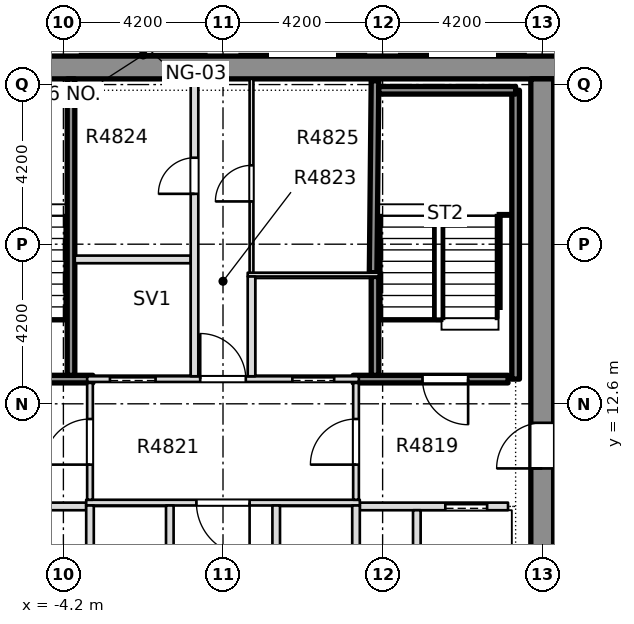
"""IFC4 building model, lengths in metres.
Left out: names, types, materials, properties, quantities, classifications, styles, units other than length and angle.
Written with IfcOpenShell. Run it as: python <this file> out.ifc"""

import sys

from ifc_helpers import new_model, si_unit, direction, frame, frame_2d, origin, place, context, subcontext, project, spatial, rectangle, extrude, element, fill, save


model = new_model("IFC4")
c1 = context("Model", 3, precision=1e-05, world=origin(), true_north=direction((0.0, 1.0)))
c2 = subcontext(c1, "Body", "Model", "MODEL_VIEW")
j1 = project(units=[si_unit("LENGTHUNIT", "METRE"), si_unit("PLANEANGLEUNIT", "RADIAN")], contexts=[c1])
p1 = place(None, origin())
s1 = spatial("IfcSite", under=j1, at=p1, CompositionType="ELEMENT")
p2 = place(p1, origin())
s2 = spatial("IfcBuilding", under=s1, at=p2, CompositionType="ELEMENT")
p3 = place(p2, frame((0.0, 0.0, 185.9)))
s3 = spatial("IfcBuildingStorey", under=s2, at=p3, CompositionType="ELEMENT", Elevation=185.9)
p4 = place(p3, frame((-12.0, 21.45, -0.4), z_axis=(0.0, 0.0, 1.0), x_axis=(1.0, 0.0, 0.0)))
e1 = element("IfcWall", 1, at=p4, inside=s3, PredefinedType="SHEAR", context=c2, shape_type="SweptSolid", body=[
    extrude(rectangle(XDim=24.0, YDim=0.6, at=frame_2d((12.0, 0.0))), origin(), (0.0, 0.0, 1.0), 3.45),
])
p5 = place(p3, frame((8.4, -7.8, -0.4), z_axis=(0.0, 0.0, 1.0), x_axis=(0.0, 1.0, 0.0)))
e2 = element("IfcWall", 2, at=p5, inside=s3, PredefinedType="SHEAR", context=c2, shape_type="SweptSolid", body=[
    extrude(rectangle(XDim=28.95, YDim=0.6, at=frame_2d((14.475, 0.0))), origin(), (0.0, 0.0, 1.0), 3.45),
])
p6 = place(p5, frame((18.7, 0.0, 0.4)))
e3 = element("IfcOpeningElement", 3, at=p6, cuts=e2, PredefinedType="OPENING", context=c2, shape_type="SweptSolid", body=[
    extrude(rectangle(XDim=1.2, YDim=2.1, at=frame_2d((0.6, 1.05))), frame((0.0, 0.31, 0.0), z_axis=(0.0, -1.0, 0.0), x_axis=(1.0, 0.0, 0.0)), (0.0, 0.0, 1.0), 0.62),
])
p7 = place(p3, frame((-7.5, 9.9, 0.0), z_axis=(0.0, 0.0, 1.0), x_axis=(1.0, 0.0, 0.0)))
e4 = element("IfcWall", 4, at=p7, inside=s3, PredefinedType="PARTITIONING", context=c2, shape_type="SweptSolid", body=[
    extrude(rectangle(XDim=3.9, YDim=0.2, at=frame_2d((1.95, 0.0))), origin(), (0.0, 0.0, 1.0), 3.05),
])
p8 = place(p7, frame((0.55, 0.0, 0.0)))
e5 = element("IfcOpeningElement", 5, at=p8, cuts=e4, PredefinedType="OPENING", context=c2, shape_type="SweptSolid", body=[
    extrude(rectangle(XDim=1.1, YDim=2.1, at=frame_2d((0.55, 1.05))), frame((0.0, 0.11, 0.0), z_axis=(0.0, -1.0, 0.0), x_axis=(1.0, 0.0, 0.0)), (0.0, 0.0, 1.0), 0.22),
])
p9 = place(p3, frame((3.6, 9.9, 0.0), z_axis=(0.0, 0.0, 1.0), x_axis=(1.0, 0.0, 0.0)))
e6 = element("IfcWall", 6, at=p9, inside=s3, PredefinedType="PARTITIONING", context=c2, shape_type="SweptSolid", body=[
    extrude(rectangle(XDim=3.9, YDim=0.2, at=frame_2d((1.95, 0.0))), origin(), (0.0, 0.0, 1.0), 3.05),
])
p10 = place(p9, frame((2.25, 0.0, 0.0)))
e7 = element("IfcOpeningElement", 7, at=p10, cuts=e6, PredefinedType="OPENING", context=c2, shape_type="SweptSolid", body=[
    extrude(rectangle(XDim=1.1, YDim=2.1, at=frame_2d((0.55, 1.05))), frame((0.0, 0.11, 0.0), z_axis=(0.0, -1.0, 0.0), x_axis=(1.0, 0.0, 0.0)), (0.0, 0.0, 1.0), 0.22),
])
p11 = place(p3, frame((-3.6, 10.0, 0.0), z_axis=(0.0, 0.0, 1.0), x_axis=(1.0, 0.0, 0.0)))
e8 = element("IfcWall", 8, at=p11, inside=s3, PredefinedType="PARTITIONING", context=c2, shape_type="SweptSolid", body=[
    extrude(rectangle(XDim=7.2, YDim=0.15, at=frame_2d((3.6, 0.0))), origin(), (0.0, 0.0, 1.0), 3.05),
])
p12 = place(p11, frame((2.9, 0.0, 0.0)))
e9 = element("IfcOpeningElement", 9, at=p12, cuts=e8, PredefinedType="OPENING", context=c2, shape_type="SweptSolid", body=[
    extrude(rectangle(XDim=1.4, YDim=2.1, at=frame_2d((0.7, 1.05))), frame((0.0, 0.085, 0.0), z_axis=(0.0, -1.0, 0.0), x_axis=(1.0, 0.0, 0.0)), (0.0, 0.0, 1.0), 0.17),
])
p13 = place(p3, frame((-7.5, 13.25, 0.0), z_axis=(0.0, 0.0, 1.0), x_axis=(1.0, 0.0, 0.0)))
e10 = element("IfcWall", 10, at=p13, inside=s3, PredefinedType="SOLIDWALL", context=c2, shape_type="SweptSolid", body=[
    extrude(rectangle(XDim=4.075, YDim=0.2, at=frame_2d((2.038, 0.0))), origin(), (0.0, 0.0, 1.0), 3.05),
])
p14 = place(p13, frame((1.05, 0.0, 0.0)))
e11 = element("IfcOpeningElement", 11, at=p14, cuts=e10, PredefinedType="OPENING", context=c2, shape_type="SweptSolid", body=[
    extrude(rectangle(XDim=1.2, YDim=2.1, at=frame_2d((0.6, 1.05))), frame((0.0, 0.11, 0.0), z_axis=(0.0, -1.0, 0.0), x_axis=(1.0, 0.0, 0.0)), (0.0, 0.0, 1.0), 0.22),
])
p15 = place(p3, frame((-3.575, 13.25, 0.0), z_axis=(0.0, 0.0, 1.0), x_axis=(1.0, 0.0, 0.0)))
e12 = element("IfcWall", 12, at=p15, inside=s3, PredefinedType="PARTITIONING", context=c2, shape_type="SweptSolid", body=[
    extrude(rectangle(XDim=7.15, YDim=0.15, at=frame_2d((3.575, 0.0))), origin(), (0.0, 0.0, 1.0), 3.05),
])
p16 = place(p15, frame((0.6, 0.0, 0.0)))
e13 = element("IfcOpeningElement", 13, at=p16, cuts=e12, PredefinedType="OPENING", context=c2, shape_type="SweptSolid", body=[
    extrude(rectangle(XDim=1.2, YDim=2.1, at=frame_2d((0.6, 1.05))), frame((0.0, 0.085, 0.0), z_axis=(0.0, -1.0, 0.0), x_axis=(1.0, 0.0, 0.0)), (0.0, 0.0, 1.0), 0.17),
])
p17 = place(p15, frame((5.4, 0.0, 0.0)))
e14 = element("IfcOpeningElement", 14, at=p17, cuts=e12, PredefinedType="OPENING", context=c2, shape_type="SweptSolid", body=[
    extrude(rectangle(XDim=1.1, YDim=2.1, at=frame_2d((0.55, 1.05))), frame((0.0, 0.085, 0.0), z_axis=(0.0, -1.0, 0.0), x_axis=(1.0, 0.0, 0.0)), (0.0, 0.0, 1.0), 0.17),
])
p18 = place(p15, frame((2.975, 0.0, 0.0)))
e15 = element("IfcOpeningElement", 15, at=p18, cuts=e12, PredefinedType="OPENING", context=c2, shape_type="SweptSolid", body=[
    extrude(rectangle(XDim=1.2, YDim=2.1, at=frame_2d((0.6, 1.05))), frame((0.0, 0.085, 0.0), z_axis=(0.0, -1.0, 0.0), x_axis=(1.0, 0.0, 0.0)), (0.0, 0.0, 1.0), 0.17),
])
p19 = place(p3, frame((3.425, 13.25, 0.0), z_axis=(0.0, 0.0, 1.0), x_axis=(1.0, 0.0, 0.0)))
e16 = element("IfcWall", 16, at=p19, inside=s3, PredefinedType="SOLIDWALL", context=c2, shape_type="SweptSolid", body=[
    extrude(rectangle(XDim=4.075, YDim=0.2, at=frame_2d((2.038, 0.0))), origin(), (0.0, 0.0, 1.0), 3.05),
])
p20 = place(p19, frame((1.825, 0.0, 0.0)))
e17 = element("IfcOpeningElement", 17, at=p20, cuts=e16, PredefinedType="OPENING", context=c2, shape_type="SweptSolid", body=[
    extrude(rectangle(XDim=1.2, YDim=2.1, at=frame_2d((0.6, 1.05))), frame((0.0, 0.11, 0.0), z_axis=(0.0, -1.0, 0.0), x_axis=(1.0, 0.0, 0.0)), (0.0, 0.0, 1.0), 0.22),
])
p21 = place(p3, frame((0.65, 16.0, 0.0), z_axis=(0.0, 0.0, 1.0), x_axis=(1.0, 0.0, 0.0)))
e18 = element("IfcWall", 18, at=p21, inside=s3, PredefinedType="PARTITIONING", context=c2, shape_type="SweptSolid", body=[
    extrude(rectangle(XDim=3.45, YDim=0.1, at=frame_2d((1.725, 0.0))), origin(), (0.0, 0.0, 1.0), 3.05),
])
p22 = place(p3, frame((-3.9, 16.4, 0.0), z_axis=(0.0, 0.0, 1.0), x_axis=(1.0, 0.0, 0.0)))
e19 = element("IfcWall", 19, at=p22, inside=s3, PredefinedType="PARTITIONING", context=c2, shape_type="SweptSolid", body=[
    extrude(rectangle(XDim=3.05, YDim=0.2, at=frame_2d((1.525, 0.0))), origin(), (0.0, 0.0, 1.0), 3.05),
])
p23 = place(p3, frame((-4.0, 13.35, 0.0), z_axis=(0.0, 0.0, 1.0), x_axis=(0.0, 1.0, 0.0)))
e20 = element("IfcWall", 20, at=p23, inside=s3, PredefinedType="SOLIDWALL", context=c2, shape_type="SweptSolid", body=[
    extrude(rectangle(XDim=7.799, YDim=0.2, at=frame_2d((3.899, 0.0))), origin(), (0.0, 0.0, 1.0), 3.05),
])
p24 = place(p3, frame((-3.5, 7.075, 0.0), z_axis=(0.0, 0.0, 1.0), x_axis=(0.0, 1.0, 0.0)))
e21 = element("IfcWall", 21, at=p24, inside=s3, PredefinedType="PARTITIONING", context=c2, shape_type="SweptSolid", body=[
    extrude(rectangle(XDim=2.85, YDim=0.2, at=frame_2d((1.425, 0.0))), origin(), (0.0, 0.0, 1.0), 3.05),
])
p25 = place(p3, frame((-3.5, 10.075, 0.0), z_axis=(0.0, 0.0, 1.0), x_axis=(0.0, 1.0, 0.0)))
e22 = element("IfcWall", 22, at=p25, inside=s3, PredefinedType="PARTITIONING", context=c2, shape_type="SweptSolid", body=[
    extrude(rectangle(XDim=3.075, YDim=0.15, at=frame_2d((1.538, 0.0))), origin(), (0.0, 0.0, 1.0), 3.05),
])
p26 = place(p25, frame((0.925, 0.0, 0.0)))
e23 = element("IfcOpeningElement", 23, at=p26, cuts=e22, PredefinedType="OPENING", context=c2, shape_type="SweptSolid", body=[
    extrude(rectangle(XDim=1.2, YDim=2.1, at=frame_2d((0.6, 1.05))), frame((0.0, 0.085, 0.0), z_axis=(0.0, -1.0, 0.0), x_axis=(1.0, 0.0, 0.0)), (0.0, 0.0, 1.0), 0.17),
])
p27 = place(p3, frame((-1.4, 7.075, 0.0), z_axis=(0.0, 0.0, 1.0), x_axis=(0.0, 1.0, 0.0)))
e24 = element("IfcWall", 24, at=p27, inside=s3, PredefinedType="PARTITIONING", context=c2, shape_type="SweptSolid", body=[
    extrude(rectangle(XDim=2.85, YDim=0.2, at=frame_2d((1.425, 0.0))), origin(), (0.0, 0.0, 1.0), 3.05),
])
p28 = place(p3, frame((-0.75, 13.325, 0.0), z_axis=(0.0, 0.0, 1.0), x_axis=(0.0, 1.0, 0.0)))
e25 = element("IfcWall", 25, at=p28, inside=s3, PredefinedType="PARTITIONING", context=c2, shape_type="SweptSolid", body=[
    extrude(rectangle(XDim=7.824, YDim=0.2, at=frame_2d((3.912, 0.0))), origin(), (0.0, 0.0, 1.0), 3.05),
])
p29 = place(p28, frame((4.8, 0.0, 0.0)))
e26 = element("IfcOpeningElement", 26, at=p29, cuts=e25, PredefinedType="OPENING", context=c2, shape_type="SweptSolid", body=[
    extrude(rectangle(XDim=0.95, YDim=2.1, at=frame_2d((0.475, 1.05))), frame((0.0, 0.11, 0.0), z_axis=(0.0, -1.0, 0.0), x_axis=(1.0, 0.0, 0.0)), (0.0, 0.0, 1.0), 0.22),
])
p30 = place(p3, frame((0.75, 13.325, 0.0), z_axis=(0.0, 0.0, 1.0), x_axis=(0.0, 1.0, 0.0)))
e27 = element("IfcWall", 27, at=p30, inside=s3, PredefinedType="PARTITIONING", context=c2, shape_type="SweptSolid", body=[
    extrude(rectangle(XDim=2.625, YDim=0.2, at=frame_2d((1.312, 0.0))), origin(), (0.0, 0.0, 1.0), 3.05),
])
p31 = place(p3, frame((0.75, 16.05, 0.0), z_axis=(0.0, 0.0, 1.0), x_axis=(0.0, 1.0, 0.0)))
e28 = element("IfcWall", 28, at=p31, inside=s3, PredefinedType="PARTITIONING", context=c2, shape_type="SweptSolid", body=[
    extrude(rectangle(XDim=5.099, YDim=0.1, at=frame_2d((2.549, 0.0))), origin(), (0.0, 0.0, 1.0), 3.05),
])
p32 = place(p31, frame((1.875, 0.0, 0.0)))
e29 = element("IfcOpeningElement", 29, at=p32, cuts=e28, PredefinedType="OPENING", context=c2, shape_type="SweptSolid", body=[
    extrude(rectangle(XDim=0.95, YDim=2.1, at=frame_2d((0.475, 1.05))), frame((0.0, 0.06, 0.0), z_axis=(0.0, -1.0, 0.0), x_axis=(1.0, 0.0, 0.0)), (0.0, 0.0, 1.0), 0.12),
])
for number, where, z_axis, x_axis in (
    (30, (1.4, 7.075, 0.0), (0.0, 0.0, 1.0), (0.0, 1.0, 0.0)),
    (31, (3.5, 7.075, 0.0), (0.0, 0.0, 1.0), (0.0, 1.0, 0.0)),
):
    element("IfcWall", number, at=place(p3, frame(where, z_axis=z_axis, x_axis=x_axis)), inside=s3, PredefinedType="PARTITIONING", context=c2, shape_type="SweptSolid", body=[
        extrude(rectangle(XDim=2.85, YDim=0.2, at=frame_2d((1.425, 0.0))), origin(), (0.0, 0.0, 1.0), 3.05),
    ])
p33 = place(p3, frame((3.5, 10.075, 0.0), z_axis=(0.0, 0.0, 1.0), x_axis=(0.0, 1.0, 0.0)))
e32 = element("IfcWall", 32, at=p33, inside=s3, PredefinedType="PARTITIONING", context=c2, shape_type="SweptSolid", body=[
    extrude(rectangle(XDim=3.075, YDim=0.15, at=frame_2d((1.538, 0.0))), origin(), (0.0, 0.0, 1.0), 3.05),
])
p34 = place(p33, frame((0.925, 0.0, 0.0)))
e33 = element("IfcOpeningElement", 33, at=p34, cuts=e32, PredefinedType="OPENING", context=c2, shape_type="SweptSolid", body=[
    extrude(rectangle(XDim=1.2, YDim=2.1, at=frame_2d((0.6, 1.05))), frame((0.0, 0.085, 0.0), z_axis=(0.0, -1.0, 0.0), x_axis=(1.0, 0.0, 0.0)), (0.0, 0.0, 1.0), 0.17),
])
p35 = place(p3, frame((4.0, 13.35, 0.0), z_axis=(0.0, 0.0, 1.0), x_axis=(0.0, 1.0, 0.0)))
e34 = element("IfcWall", 34, at=p35, inside=s3, PredefinedType="SOLIDWALL", context=c2, shape_type="SweptSolid", body=[
    extrude(rectangle(XDim=2.6, YDim=0.2, at=frame_2d((1.3, 0.0))), origin(), (0.0, 0.0, 1.0), 3.05),
])
p36 = place(p3, frame((3.95, 16.05, 0.0), z_axis=(0.0, 0.0, 1.0), x_axis=(0.009911993103, 0.99995087499, 0.0)))
e35 = element("IfcWall", 35, at=p36, inside=s3, PredefinedType="SOLIDWALL", context=c2, shape_type="SweptSolid", body=[
    extrude(rectangle(XDim=5.049, YDim=0.2, at=frame_2d((2.525, 0.0))), origin(), (0.0, 0.0, 1.0), 3.05),
])
p37 = place(p3, frame((5.1, 7.075, 0.0), z_axis=(0.0, 0.0, 1.0), x_axis=(0.0, 1.0, 0.0)))
e36 = element("IfcWall", 36, at=p37, inside=s3, PredefinedType="PARTITIONING", context=c2, shape_type="SweptSolid", body=[
    extrude(rectangle(XDim=2.725, YDim=0.2, at=frame_2d((1.363, 0.0))), origin(), (0.0, 0.0, 1.0), 3.05),
])
p38 = place(p3, frame((-7.7, 20.85, 0.0), z_axis=(0.0, 0.0, 1.0), x_axis=(1.0, 0.0, 0.0)))
e37 = element("IfcWall", 37, at=p38, inside=s3, PredefinedType="SOLIDWALL", context=c2, shape_type="SweptSolid", body=[
    extrude(rectangle(XDim=3.55, YDim=0.2, at=frame_2d((1.775, 0.0))), origin(), (0.0, 0.0, 1.0), 3.05),
])
p39 = place(p3, frame((7.7, 13.25, 0.0), z_axis=(0.0, 0.0, 1.0), x_axis=(0.0, 1.0, 0.0)))
e38 = element("IfcWall", 38, at=p39, inside=s3, PredefinedType="SOLIDWALL", context=c2, shape_type="SweptSolid", body=[
    extrude(rectangle(XDim=7.6, YDim=0.2, at=frame_2d((3.8, 0.0))), origin(), (0.0, 0.0, 1.0), 3.05),
])
p40 = place(p3, frame((4.1, 20.85, 0.0), z_axis=(0.0, 0.0, 1.0), x_axis=(1.0, 0.0, 0.0)))
e39 = element("IfcWall", 39, at=p40, inside=s3, PredefinedType="SOLIDWALL", context=c2, shape_type="SweptSolid", body=[
    extrude(rectangle(XDim=3.6, YDim=0.2, at=frame_2d((1.8, 0.0))), origin(), (0.0, 0.0, 1.0), 3.05),
])
p41 = place(p20, origin())
e40 = element("IfcDoor", 40, at=p41, inside=s3, OperationType="SINGLE_SWING_RIGHT", PredefinedType="DOOR", context=c2, shape_type="SweptSolid", body=[
    extrude(rectangle(XDim=1.2, YDim=2.1, at=frame_2d((0.6, 1.05))), frame((0.0, 0.025, 0.0), z_axis=(0.0, -1.0, 0.0), x_axis=(1.0, 0.0, 0.0)), (0.0, 0.0, 1.0), 0.05),
])
fill(e17, e40)
p42 = place(p10, origin())
e41 = element("IfcDoor", 41, at=p42, inside=s3, OperationType="SLIDING_TO_LEFT", PredefinedType="DOOR", context=c2, shape_type="SweptSolid", body=[
    extrude(rectangle(XDim=1.1, YDim=2.1, at=frame_2d((0.55, 1.05))), frame((0.0, 0.025, 0.0), z_axis=(0.0, -1.0, 0.0), x_axis=(1.0, 0.0, 0.0)), (0.0, 0.0, 1.0), 0.05),
])
fill(e7, e41)
p43 = place(p12, origin())
e42 = element("IfcDoor", 42, at=p43, inside=s3, OperationType="SINGLE_SWING_RIGHT", PredefinedType="DOOR", context=c2, shape_type="SweptSolid", body=[
    extrude(rectangle(XDim=1.4, YDim=2.1, at=frame_2d((0.7, 1.05))), frame((0.0, 0.025, 0.0), z_axis=(0.0, -1.0, 0.0), x_axis=(1.0, 0.0, 0.0)), (0.0, 0.0, 1.0), 0.05),
])
fill(e9, e42)
p44 = place(p16, origin())
e43 = element("IfcDoor", 43, at=p44, inside=s3, OperationType="SLIDING_TO_RIGHT", PredefinedType="DOOR", context=c2, shape_type="SweptSolid", body=[
    extrude(rectangle(XDim=1.2, YDim=2.1, at=frame_2d((0.6, 1.05))), frame((0.0, 0.025, 0.0), z_axis=(0.0, -1.0, 0.0), x_axis=(1.0, 0.0, 0.0)), (0.0, 0.0, 1.0), 0.05),
])
fill(e13, e43)
p45 = place(p17, origin())
e44 = element("IfcDoor", 44, at=p45, inside=s3, OperationType="SLIDING_TO_LEFT", PredefinedType="DOOR", context=c2, shape_type="SweptSolid", body=[
    extrude(rectangle(XDim=1.1, YDim=2.1, at=frame_2d((0.55, 1.05))), frame((0.0, 0.025, 0.0), z_axis=(0.0, -1.0, 0.0), x_axis=(1.0, 0.0, 0.0)), (0.0, 0.0, 1.0), 0.05),
])
fill(e14, e44)
p46 = place(p18, origin())
e45 = element("IfcDoor", 45, at=p46, inside=s3, OperationType="SINGLE_SWING_RIGHT", PredefinedType="DOOR", context=c2, shape_type="SweptSolid", body=[
    extrude(rectangle(XDim=1.2, YDim=2.1, at=frame_2d((0.6, 1.05))), frame((0.0, 0.025, 0.0), z_axis=(0.0, -1.0, 0.0), x_axis=(1.0, 0.0, 0.0)), (0.0, 0.0, 1.0), 0.05),
])
fill(e15, e45)
p47 = place(p29, origin())
e46 = element("IfcDoor", 46, at=p47, inside=s3, OperationType="SINGLE_SWING_RIGHT", PredefinedType="DOOR", context=c2, shape_type="SweptSolid", body=[
    extrude(rectangle(XDim=0.95, YDim=2.1, at=frame_2d((0.475, 1.05))), frame((0.0, 0.025, 0.0), z_axis=(0.0, -1.0, 0.0), x_axis=(1.0, 0.0, 0.0)), (0.0, 0.0, 1.0), 0.05),
])
fill(e26, e46)
p48 = place(p32, origin())
e47 = element("IfcDoor", 47, at=p48, inside=s3, OperationType="SINGLE_SWING_LEFT", PredefinedType="DOOR", context=c2, shape_type="SweptSolid", body=[
    extrude(rectangle(XDim=0.95, YDim=2.1, at=frame_2d((0.475, 1.05))), frame((0.0, 0.025, 0.0), z_axis=(0.0, -1.0, 0.0), x_axis=(1.0, 0.0, 0.0)), (0.0, 0.0, 1.0), 0.05),
])
fill(e29, e47)
p49 = place(p26, origin())
e48 = element("IfcDoor", 48, at=p49, inside=s3, OperationType="SINGLE_SWING_RIGHT", PredefinedType="DOOR", context=c2, shape_type="SweptSolid", body=[
    extrude(rectangle(XDim=1.2, YDim=2.1, at=frame_2d((0.6, 1.05))), frame((0.0, 0.025, 0.0), z_axis=(0.0, -1.0, 0.0), x_axis=(1.0, 0.0, 0.0)), (0.0, 0.0, 1.0), 0.05),
])
fill(e23, e48)
p50 = place(p34, origin())
e49 = element("IfcDoor", 49, at=p50, inside=s3, OperationType="SINGLE_SWING_LEFT", PredefinedType="DOOR", context=c2, shape_type="SweptSolid", body=[
    extrude(rectangle(XDim=1.2, YDim=2.1, at=frame_2d((0.6, 1.05))), frame((0.0, 0.025, 0.0), z_axis=(0.0, -1.0, 0.0), x_axis=(1.0, 0.0, 0.0)), (0.0, 0.0, 1.0), 0.05),
])
fill(e33, e49)
p51 = place(p6, origin())
e50 = element("IfcDoor", 50, at=p51, inside=s3, OperationType="SINGLE_SWING_LEFT", PredefinedType="DOOR", context=c2, shape_type="SweptSolid", body=[
    extrude(rectangle(XDim=1.2, YDim=2.1, at=frame_2d((0.6, 1.05))), frame((0.0, 0.025, 0.0), z_axis=(0.0, -1.0, 0.0), x_axis=(1.0, 0.0, 0.0)), (0.0, 0.0, 1.0), 0.05),
])
fill(e3, e50)
save(model, sys.argv[1])
